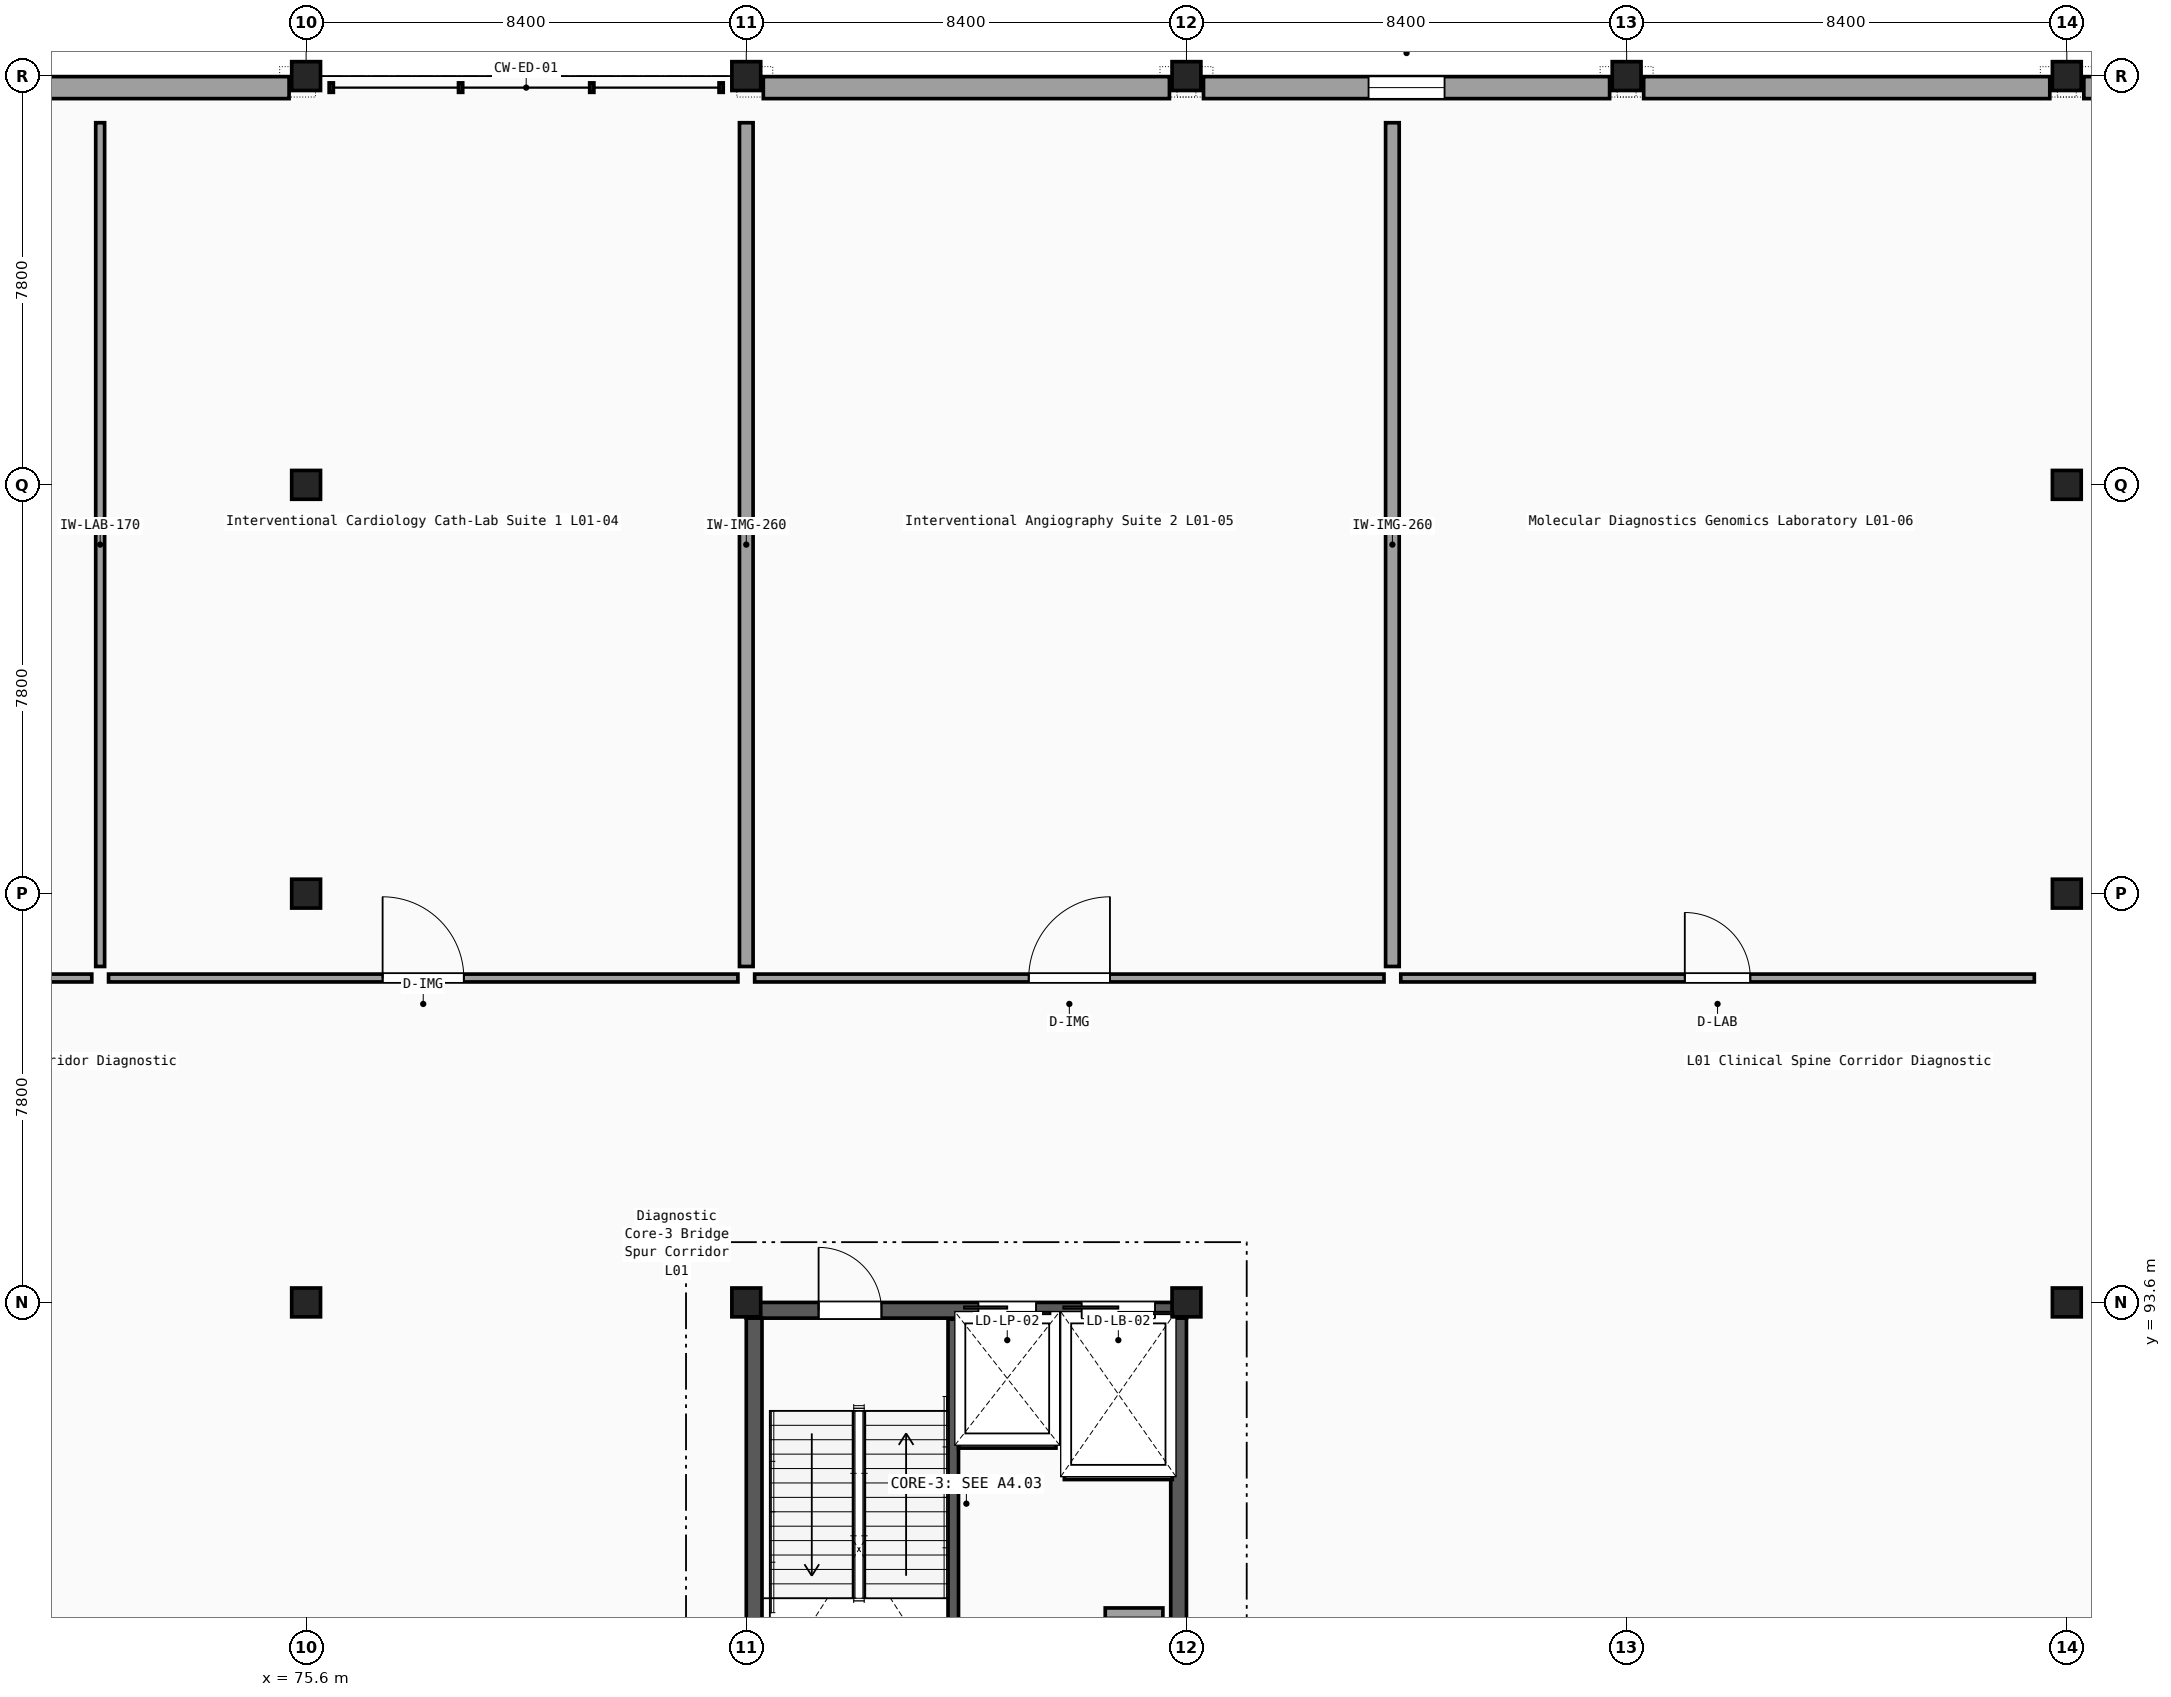
"""IFC4 building model, lengths in metres.
Left out: names, types, materials, properties, quantities, classifications, styles, units other than length and angle.
Written with IfcOpenShell. Run it as: python <this file> out.ifc"""

import sys

from ifc_helpers import new_model, si_unit, direction, frame, frame_2d, origin, origin_2d, place, context, subcontext, project, spatial, rectangle, circle, extrude, element, fill, save


model = new_model("IFC4")
c1 = context("Model", 3, precision=1e-05, world=origin(), true_north=direction((0.0, 1.0)))
c2 = subcontext(c1, "Body", "Model", "MODEL_VIEW")
j1 = project(units=[si_unit("LENGTHUNIT", "METRE"), si_unit("PLANEANGLEUNIT", "RADIAN")], contexts=[c1])
p1 = place(None, origin())
s1 = spatial("IfcSite", under=j1, at=p1, CompositionType="ELEMENT")
p2 = place(p1, origin())
s2 = spatial("IfcBuilding", under=s1, at=p2, CompositionType="ELEMENT")
p3 = place(p2, frame((0.0, 0.0, 5.1)))
s3 = spatial("IfcBuildingStorey", under=s2, at=p3, CompositionType="ELEMENT", Elevation=5.1)
for number, where, z_axis, x_axis in (
    (1, (75.6, 93.6, 0.0), (0.0, 0.0, 1.0), (1.0, 0.0, 0.0)),
    (2, (75.6, 101.4, 0.0), (0.0, 0.0, 1.0), (1.0, 0.0, 0.0)),
    (3, (75.6, 109.2, 0.0), (0.0, 0.0, 1.0), (1.0, 0.0, 0.0)),
    (4, (75.6, 117.0, 0.0), (0.0, 0.0, 1.0), (1.0, 0.0, 0.0)),
    (5, (84.0, 93.6, 0.0), (0.0, 0.0, 1.0), (1.0, 0.0, 0.0)),
    (6, (84.0, 117.0, 0.0), (0.0, 0.0, 1.0), (1.0, 0.0, 0.0)),
    (7, (92.4, 93.6, 0.0), (0.0, 0.0, 1.0), (1.0, 0.0, 0.0)),
    (8, (92.4, 117.0, 0.0), (0.0, 0.0, 1.0), (1.0, 0.0, 0.0)),
    (9, (100.8, 117.0, 0.0), (0.0, 0.0, 1.0), (1.0, 0.0, 0.0)),
    (10, (109.2, 93.6, 0.0), (0.0, 0.0, 1.0), (1.0, 0.0, 0.0)),
    (11, (109.2, 101.4, 0.0), (0.0, 0.0, 1.0), (1.0, 0.0, 0.0)),
    (12, (109.2, 109.2, 0.0), (0.0, 0.0, 1.0), (1.0, 0.0, 0.0)),
    (13, (109.2, 117.0, 0.0), (0.0, 0.0, 1.0), (1.0, 0.0, 0.0)),
):
    element("IfcColumn", number, at=place(p3, frame(where, z_axis=z_axis, x_axis=x_axis)), inside=s3, PredefinedType="COLUMN", context=c2, shape_type="SweptSolid", body=[
        extrude(circle(Radius=0.275, at=origin_2d()), origin(), (0.0, 0.0, 1.0), 5.1),
    ])
p4 = place(p3, frame((67.525, 116.78, 0.0), z_axis=(0.0, 0.0, 1.0), x_axis=(1.0, 0.0, 0.0)))
e14 = element("IfcWall", 14, at=p4, inside=s3, PredefinedType="SOLIDWALL", context=c2, shape_type="SweptSolid", body=[
    extrude(rectangle(XDim=7.75, YDim=0.42, at=frame_2d((3.875, 0.0))), origin(), (0.0, 0.0, 1.0), 4.43),
])
p5 = place(p3, frame((84.325, 116.78, 0.0), z_axis=(0.0, 0.0, 1.0), x_axis=(1.0, 0.0, 0.0)))
e15 = element("IfcWall", 15, at=p5, inside=s3, PredefinedType="SOLIDWALL", context=c2, shape_type="SweptSolid", body=[
    extrude(rectangle(XDim=7.75, YDim=0.42, at=frame_2d((3.875, 0.0))), origin(), (0.0, 0.0, 1.0), 4.44),
])
p6 = place(p3, frame((92.725, 116.78, 0.0), z_axis=(0.0, 0.0, 1.0), x_axis=(1.0, 0.0, 0.0)))
e16 = element("IfcWall", 16, at=p6, inside=s3, PredefinedType="SOLIDWALL", context=c2, shape_type="SweptSolid", body=[
    extrude(rectangle(XDim=7.75, YDim=0.42, at=frame_2d((3.875, 0.0))), origin(), (0.0, 0.0, 1.0), 4.44),
])
p7 = place(p6, frame((3.15, 0.0, 0.85)))
e17 = element("IfcOpeningElement", 17, at=p7, cuts=e16, PredefinedType="OPENING", context=c2, shape_type="SweptSolid", body=[
    extrude(rectangle(XDim=1.45, YDim=1.65, at=frame_2d((0.725, 0.825))), frame((0.0, 0.22, 0.0), z_axis=(0.0, -1.0, 0.0), x_axis=(1.0, 0.0, 0.0)), (0.0, 0.0, 1.0), 0.44),
])
for number, where, z_axis, x_axis in (
    (18, (101.125, 116.78, 0.0), (0.0, 0.0, 1.0), (1.0, 0.0, 0.0)),
    (19, (109.525, 116.78, 0.0), (0.0, 0.0, 1.0), (1.0, 0.0, 0.0)),
):
    element("IfcWall", number, at=place(p3, frame(where, z_axis=z_axis, x_axis=x_axis)), inside=s3, PredefinedType="SOLIDWALL", context=c2, shape_type="SweptSolid", body=[
        extrude(rectangle(XDim=7.75, YDim=0.42, at=frame_2d((3.875, 0.0))), origin(), (0.0, 0.0, 1.0), 4.43),
    ])
p8 = place(p3, frame((84.0, 93.45, 0.0), z_axis=(0.0, 0.0, 1.0), x_axis=(1.0, 0.0, 0.0)))
e20 = element("IfcWall", 20, at=p8, inside=s3, PredefinedType="SHEAR", context=c2, shape_type="SweptSolid", body=[
    extrude(rectangle(XDim=8.4, YDim=0.3, at=frame_2d((4.2, 0.0))), origin(), (0.0, 0.0, 1.0), 4.85),
])
p9 = place(p8, frame((1.38, 0.0, 0.0)))
e21 = element("IfcOpeningElement", 21, at=p9, cuts=e20, PredefinedType="OPENING", context=c2, shape_type="SweptSolid", body=[
    extrude(rectangle(XDim=1.2, YDim=2.15, at=frame_2d((0.6, 1.075))), frame((0.0, 0.16, 0.0), z_axis=(0.0, -1.0, 0.0), x_axis=(1.0, 0.0, 0.0)), (0.0, 0.0, 1.0), 0.32),
])
p10 = place(p8, frame((4.43, 0.0, 0.0)))
e22 = element("IfcOpeningElement", 22, at=p10, cuts=e20, PredefinedType="OPENING", context=c2, shape_type="SweptSolid", body=[
    extrude(rectangle(XDim=1.1, YDim=2.15, at=frame_2d((0.55, 1.075))), frame((0.0, 0.16, 0.0), z_axis=(0.0, -1.0, 0.0), x_axis=(1.0, 0.0, 0.0)), (0.0, 0.0, 1.0), 0.32),
])
p11 = place(p8, frame((6.4, 0.0, 0.0)))
e23 = element("IfcOpeningElement", 23, at=p11, cuts=e20, PredefinedType="OPENING", context=c2, shape_type="SweptSolid", body=[
    extrude(rectangle(XDim=1.4, YDim=2.2, at=frame_2d((0.7, 1.1))), frame((0.0, 0.16, 0.0), z_axis=(0.0, -1.0, 0.0), x_axis=(1.0, 0.0, 0.0)), (0.0, 0.0, 1.0), 0.32),
])
for number, where, z_axis, x_axis in (
    (24, (84.15, 86.22, 0.0), (0.0, 0.0, 1.0), (0.0, 1.0, 0.0)),
    (25, (92.25, 86.22, 0.0), (0.0, 0.0, 1.0), (0.0, 1.0, 0.0)),
):
    element("IfcWall", number, at=place(p3, frame(where, z_axis=z_axis, x_axis=x_axis)), inside=s3, PredefinedType="SHEAR", context=c2, shape_type="SweptSolid", body=[
        extrude(rectangle(XDim=7.08, YDim=0.3, at=frame_2d((3.54, 0.0))), origin(), (0.0, 0.0, 1.0), 4.85),
    ])
p12 = place(p3, frame((87.95, 86.24, 0.0), z_axis=(0.0, 0.0, 1.0), x_axis=(0.0, 1.0, 0.0)))
e26 = element("IfcWall", 26, at=p12, inside=s3, PredefinedType="SHEAR", context=c2, shape_type="SweptSolid", body=[
    extrude(rectangle(XDim=7.04, YDim=0.2, at=frame_2d((3.52, 0.0))), origin(), (0.0, 0.0, 1.0), 4.85),
])
p13 = place(p3, frame((90.85, 87.67, 0.0), z_axis=(0.0, 0.0, 1.0), x_axis=(1.0, 0.0, 0.0)))
e27 = element("IfcWall", 27, at=p13, inside=s3, PredefinedType="PARTITIONING", context=c2, shape_type="SweptSolid", body=[
    extrude(rectangle(XDim=1.1, YDim=0.2, at=frame_2d((0.55, 0.0))), origin(), (0.0, 0.0, 1.0), 4.34),
])
p14 = place(p3, frame((89.94, 91.08, 0.0), z_axis=(0.0, 0.0, 1.0), x_axis=(0.0, 1.0, 0.0)))
e28 = element("IfcWall", 28, at=p14, inside=s3, PredefinedType="PARTITIONING", context=c2, shape_type="SweptSolid", body=[
    extrude(rectangle(XDim=2.14, YDim=0.2, at=frame_2d((1.07, 0.0))), origin(), (0.0, 0.0, 1.0), 4.34),
])
p15 = place(p3, frame((88.05, 90.92, 0.0), z_axis=(0.0, 0.0, 1.0), x_axis=(1.0, 0.0, 0.0)))
e29 = element("IfcWall", 29, at=p15, inside=s3, PredefinedType="PARTITIONING", context=c2, shape_type="SweptSolid", body=[
    extrude(rectangle(XDim=1.86, YDim=0.2, at=frame_2d((0.93, 0.0))), origin(), (0.0, 0.0, 1.0), 4.34),
])
p16 = place(p3, frame((90.07, 90.32, 0.0), z_axis=(0.0, 0.0, 1.0), x_axis=(1.0, 0.0, 0.0)))
e30 = element("IfcWall", 30, at=p16, inside=s3, PredefinedType="PARTITIONING", context=c2, shape_type="SweptSolid", body=[
    extrude(rectangle(XDim=2.06, YDim=0.2, at=frame_2d((1.03, 0.0))), origin(), (0.0, 0.0, 1.0), 4.34),
])
p17 = place(p3, frame((59.42, 99.79, 0.0), z_axis=(0.0, 0.0, 1.0), x_axis=(1.0, 0.0, 0.0)))
e31 = element("IfcWall", 31, at=p17, inside=s3, PredefinedType="PARTITIONING", context=c2, shape_type="SweptSolid", body=[
    extrude(rectangle(XDim=12.09, YDim=0.15, at=frame_2d((6.045, 0.0))), origin(), (0.0, 0.0, 1.0), 4.43),
])
p18 = place(p17, frame((5.42, 0.0, 0.0)))
e32 = element("IfcOpeningElement", 32, at=p18, cuts=e31, PredefinedType="OPENING", context=c2, shape_type="SweptSolid", body=[
    extrude(rectangle(XDim=1.25, YDim=2.2, at=frame_2d((0.625, 1.1))), frame((0.0, 0.085, 0.0), z_axis=(0.0, -1.0, 0.0), x_axis=(1.0, 0.0, 0.0)), (0.0, 0.0, 1.0), 0.17),
])
p19 = place(p3, frame((71.67, 100.01, 0.0), z_axis=(0.0, 0.0, 1.0), x_axis=(0.0, 1.0, 0.0)))
e33 = element("IfcWall", 33, at=p19, inside=s3, PredefinedType="PARTITIONING", context=c2, shape_type="SweptSolid", body=[
    extrude(rectangle(XDim=16.1, YDim=0.17, at=frame_2d((8.05, 0.0))), origin(), (0.0, 0.0, 1.0), 4.24),
])
p20 = place(p3, frame((71.83, 99.79, 0.0), z_axis=(0.0, 0.0, 1.0), x_axis=(1.0, 0.0, 0.0)))
e34 = element("IfcWall", 34, at=p20, inside=s3, PredefinedType="PARTITIONING", context=c2, shape_type="SweptSolid", body=[
    extrude(rectangle(XDim=12.01, YDim=0.15, at=frame_2d((6.005, 0.0))), origin(), (0.0, 0.0, 1.0), 4.43),
])
p21 = place(p20, frame((5.23, 0.0, 0.0)))
e35 = element("IfcOpeningElement", 35, at=p21, cuts=e34, PredefinedType="OPENING", context=c2, shape_type="SweptSolid", body=[
    extrude(rectangle(XDim=1.55, YDim=2.25, at=frame_2d((0.775, 1.125))), frame((0.0, 0.085, 0.0), z_axis=(0.0, -1.0, 0.0), x_axis=(1.0, 0.0, 0.0)), (0.0, 0.0, 1.0), 0.17),
])
p22 = place(p3, frame((84.0, 100.01, 0.0), z_axis=(0.0, 0.0, 1.0), x_axis=(0.0, 1.0, 0.0)))
e36 = element("IfcWall", 36, at=p22, inside=s3, PredefinedType="PARTITIONING", context=c2, shape_type="SweptSolid", body=[
    extrude(rectangle(XDim=16.1, YDim=0.26, at=frame_2d((8.05, 0.0))), origin(), (0.0, 0.0, 1.0), 4.82),
])
p23 = place(p3, frame((84.16, 99.79, 0.0), z_axis=(0.0, 0.0, 1.0), x_axis=(1.0, 0.0, 0.0)))
e37 = element("IfcWall", 37, at=p23, inside=s3, PredefinedType="PARTITIONING", context=c2, shape_type="SweptSolid", body=[
    extrude(rectangle(XDim=12.01, YDim=0.15, at=frame_2d((6.005, 0.0))), origin(), (0.0, 0.0, 1.0), 4.82),
])
p24 = place(p23, frame((5.23, 0.0, 0.0)))
e38 = element("IfcOpeningElement", 38, at=p24, cuts=e37, PredefinedType="OPENING", context=c2, shape_type="SweptSolid", body=[
    extrude(rectangle(XDim=1.55, YDim=2.25, at=frame_2d((0.775, 1.125))), frame((0.0, 0.085, 0.0), z_axis=(0.0, -1.0, 0.0), x_axis=(1.0, 0.0, 0.0)), (0.0, 0.0, 1.0), 0.17),
])
p25 = place(p3, frame((96.33, 100.01, 0.0), z_axis=(0.0, 0.0, 1.0), x_axis=(0.0, 1.0, 0.0)))
e39 = element("IfcWall", 39, at=p25, inside=s3, PredefinedType="PARTITIONING", context=c2, shape_type="SweptSolid", body=[
    extrude(rectangle(XDim=16.1, YDim=0.26, at=frame_2d((8.05, 0.0))), origin(), (0.0, 0.0, 1.0), 4.82),
])
p26 = place(p3, frame((96.49, 99.79, 0.0), z_axis=(0.0, 0.0, 1.0), x_axis=(1.0, 0.0, 0.0)))
e40 = element("IfcWall", 40, at=p26, inside=s3, PredefinedType="PARTITIONING", context=c2, shape_type="SweptSolid", body=[
    extrude(rectangle(XDim=12.09, YDim=0.15, at=frame_2d((6.045, 0.0))), origin(), (0.0, 0.0, 1.0), 4.82),
])
p27 = place(p26, frame((5.42, 0.0, 0.0)))
e41 = element("IfcOpeningElement", 41, at=p27, cuts=e40, PredefinedType="OPENING", context=c2, shape_type="SweptSolid", body=[
    extrude(rectangle(XDim=1.25, YDim=2.2, at=frame_2d((0.625, 1.1))), frame((0.0, 0.085, 0.0), z_axis=(0.0, -1.0, 0.0), x_axis=(1.0, 0.0, 0.0)), (0.0, 0.0, 1.0), 0.17),
])
p28 = place(p7, origin())
e42 = element("IfcWindow", 42, at=p28, inside=s3, PartitioningType="SINGLE_PANEL", PredefinedType="WINDOW", context=c2, shape_type="SweptSolid", body=[
    extrude(rectangle(XDim=1.45, YDim=1.65, at=frame_2d((0.725, 0.825))), frame((0.0, 0.03, 0.0), z_axis=(0.0, -1.0, 0.0), x_axis=(1.0, 0.0, 0.0)), (0.0, 0.0, 1.0), 0.06),
])
fill(e17, e42)
p29 = place(p9, origin())
e43 = element("IfcDoor", 43, at=p29, inside=s3, OperationType="SINGLE_SWING_LEFT", PredefinedType="DOOR", context=c2, shape_type="SweptSolid", body=[
    extrude(rectangle(XDim=1.2, YDim=2.15, at=frame_2d((0.6, 1.075))), frame((0.0, 0.025, 0.0), z_axis=(0.0, -1.0, 0.0), x_axis=(1.0, 0.0, 0.0)), (0.0, 0.0, 1.0), 0.05),
])
fill(e21, e43)
p30 = place(p10, origin())
e44 = element("IfcDoor", 44, at=p30, inside=s3, OperationType="DOUBLE_DOOR_SLIDING", PredefinedType="DOOR", context=c2, shape_type="SweptSolid", body=[
    extrude(rectangle(XDim=1.1, YDim=2.15, at=frame_2d((0.55, 1.075))), frame((0.0, 0.025, 0.0), z_axis=(0.0, -1.0, 0.0), x_axis=(1.0, 0.0, 0.0)), (0.0, 0.0, 1.0), 0.05),
])
fill(e22, e44)
p31 = place(p11, origin())
e45 = element("IfcDoor", 45, at=p31, inside=s3, OperationType="DOUBLE_DOOR_SLIDING", PredefinedType="DOOR", context=c2, shape_type="SweptSolid", body=[
    extrude(rectangle(XDim=1.4, YDim=2.2, at=frame_2d((0.7, 1.1))), frame((0.0, 0.025, 0.0), z_axis=(0.0, -1.0, 0.0), x_axis=(1.0, 0.0, 0.0)), (0.0, 0.0, 1.0), 0.05),
])
fill(e23, e45)
p32 = place(p21, origin())
e46 = element("IfcDoor", 46, at=p32, inside=s3, OperationType="SINGLE_SWING_LEFT", PredefinedType="DOOR", context=c2, shape_type="SweptSolid", body=[
    extrude(rectangle(XDim=1.55, YDim=2.25, at=frame_2d((0.775, 1.125))), frame((0.0, 0.025, 0.0), z_axis=(0.0, -1.0, 0.0), x_axis=(1.0, 0.0, 0.0)), (0.0, 0.0, 1.0), 0.05),
])
fill(e35, e46)
p33 = place(p24, origin())
e47 = element("IfcDoor", 47, at=p33, inside=s3, OperationType="SINGLE_SWING_RIGHT", PredefinedType="DOOR", context=c2, shape_type="SweptSolid", body=[
    extrude(rectangle(XDim=1.55, YDim=2.25, at=frame_2d((0.775, 1.125))), frame((0.0, 0.025, 0.0), z_axis=(0.0, -1.0, 0.0), x_axis=(1.0, 0.0, 0.0)), (0.0, 0.0, 1.0), 0.05),
])
fill(e38, e47)
p34 = place(p27, origin())
e48 = element("IfcDoor", 48, at=p34, inside=s3, OperationType="SINGLE_SWING_LEFT", PredefinedType="DOOR", context=c2, shape_type="SweptSolid", body=[
    extrude(rectangle(XDim=1.25, YDim=2.2, at=frame_2d((0.625, 1.1))), frame((0.0, 0.025, 0.0), z_axis=(0.0, -1.0, 0.0), x_axis=(1.0, 0.0, 0.0)), (0.0, 0.0, 1.0), 0.05),
])
fill(e41, e48)
save(model, sys.argv[1])
